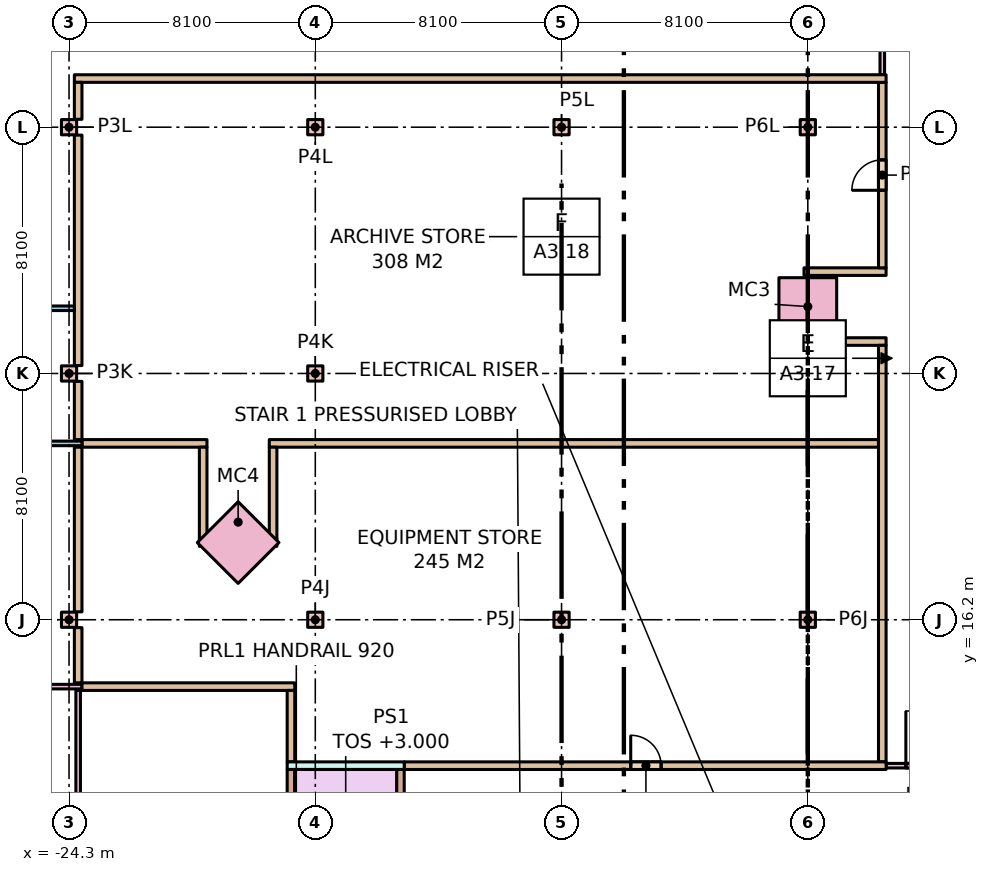
"""IFC4 building model, lengths in metres.
Left out: names, types, materials, properties, quantities, classifications, styles, units other than length and angle.
Written with IfcOpenShell. Run it as: python <this file> out.ifc"""

import sys

from ifc_helpers import new_model, si_unit, direction, frame, frame_2d, origin, origin_2d, place, context, subcontext, project, spatial, rectangle, extrude, element, fill, save


model = new_model("IFC4")
c1 = context("Model", 3, precision=1e-05, world=origin(), true_north=direction((0.0, 1.0)))
c2 = subcontext(c1, "Body", "Model", "MODEL_VIEW")
j1 = project(units=[si_unit("LENGTHUNIT", "METRE"), si_unit("PLANEANGLEUNIT", "RADIAN")], contexts=[c1])
p1 = place(None, origin())
s1 = spatial("IfcSite", under=j1, at=p1, CompositionType="ELEMENT")
p2 = place(p1, origin())
s2 = spatial("IfcBuilding", under=s1, at=p2, CompositionType="ELEMENT")
p3 = place(p2, origin())
s3 = spatial("IfcBuildingStorey", under=s2, at=p3, CompositionType="ELEMENT", Elevation=0.0)
for number, where, z_axis, x_axis in (
    (1, (-24.3, 16.2, 0.0), (0.0, 0.0, 1.0), (1.0, 0.0, 0.0)),
    (2, (-24.3, 24.3, 0.0), (0.0, 0.0, 1.0), (1.0, 0.0, 0.0)),
    (3, (-24.3, 32.4, 0.0), (0.0, 0.0, 1.0), (1.0, 0.0, 0.0)),
    (4, (-16.2, 16.2, 0.0), (0.0, 0.0, 1.0), (1.0, 0.0, 0.0)),
    (5, (-16.2, 24.3, 0.0), (0.0, 0.0, 1.0), (1.0, 0.0, 0.0)),
    (6, (-16.2, 32.4, 0.0), (0.0, 0.0, 1.0), (1.0, 0.0, 0.0)),
    (7, (-8.1, 16.2, 0.0), (0.0, 0.0, 1.0), (1.0, 0.0, 0.0)),
    (8, (-8.1, 32.4, 0.0), (0.0, 0.0, 1.0), (1.0, 0.0, 0.0)),
    (9, (0.0, 16.2, 0.0), (0.0, 0.0, 1.0), (1.0, 0.0, 0.0)),
    (10, (0.0, 32.4, 0.0), (0.0, 0.0, 1.0), (1.0, 0.0, 0.0)),
):
    element("IfcColumn", number, at=place(p3, frame(where, z_axis=z_axis, x_axis=x_axis)), inside=s3, PredefinedType="COLUMN", context=c2, shape_type="SweptSolid", body=[
        extrude(rectangle(XDim=0.5, YDim=0.5, at=origin_2d()), origin(), (0.0, 0.0, 1.0), 6.0),
    ])
for number, where, z_axis, x_axis in (
    (11, (0.0, 26.5, 0.0), (0.0, 0.0, 1.0), (-1.0, 0.0, 0.0)),
    (12, (-18.738, 18.738, 0.0), (0.0, 0.0, 1.0), (-0.707, -0.707, 0.0)),
):
    element("IfcColumn", number, at=place(p3, frame(where, z_axis=z_axis, x_axis=x_axis)), inside=s3, PredefinedType="COLUMN", context=c2, shape_type="SweptSolid", body=[
        extrude(rectangle(XDim=1.9, YDim=1.9, at=origin_2d()), origin(), (0.0, 0.0, 1.0), 6.0),
    ])
for number, where, z_axis, x_axis in (
    (13, (-20.013, 18.738, 0.0), (0.0, 0.0, 1.0), (1.0, 0.0, 0.0)),
    (14, (-17.778, 18.738, 0.0), (0.0, 0.0, 1.0), (1.0, 0.0, 0.0)),
):
    element("IfcWall", number, at=place(p3, frame(where, z_axis=z_axis, x_axis=x_axis)), inside=s3, PredefinedType="PARTITIONING", context=c2, shape_type="SweptSolid", body=[
        extrude(rectangle(XDim=0.315, YDim=0.25, at=frame_2d((0.157, 0.0))), origin(), (0.0, 0.0, 1.0), 5.68),
    ])
p4 = place(p3, frame((-23.875, 22.0, 0.0), z_axis=(0.0, 0.0, 1.0), x_axis=(1.0, 0.0, 0.0)))
e15 = element("IfcWall", 15, at=p4, inside=s3, PredefinedType="PARTITIONING", context=c2, shape_type="SweptSolid", body=[
    extrude(rectangle(XDim=4.112, YDim=0.25, at=frame_2d((2.056, 0.0))), origin(), (0.0, 0.0, 1.0), 5.68),
])
p5 = place(p3, frame((-17.713, 22.0, 0.0), z_axis=(0.0, 0.0, 1.0), x_axis=(1.0, 0.0, 0.0)))
e16 = element("IfcWall", 16, at=p5, inside=s3, PredefinedType="PARTITIONING", context=c2, shape_type="SweptSolid", body=[
    extrude(rectangle(XDim=20.038, YDim=0.25, at=frame_2d((10.019, 0.0))), origin(), (0.0, 0.0, 1.0), 5.68),
])
for number, where, z_axis, x_axis in (
    (17, (-19.888, 18.863, 0.0), (0.0, 0.0, 1.0), (0.0, 1.0, 0.0)),
    (18, (-17.588, 18.863, 0.0), (0.0, 0.0, 1.0), (0.0, 1.0, 0.0)),
):
    element("IfcWall", number, at=place(p3, frame(where, z_axis=z_axis, x_axis=x_axis)), inside=s3, PredefinedType="PARTITIONING", context=c2, shape_type="SweptSolid", body=[
        extrude(rectangle(XDim=3.012, YDim=0.25, at=frame_2d((1.506, 0.0))), origin(), (0.0, 0.0, 1.0), 5.68),
    ])
for number, where, z_axis, x_axis in (
    (19, (-0.125, 25.35, 0.0), (0.0, 0.0, 1.0), (1.0, 0.0, 0.0)),
    (20, (-0.125, 27.65, 0.0), (0.0, 0.0, 1.0), (1.0, 0.0, 0.0)),
):
    element("IfcWall", number, at=place(p3, frame(where, z_axis=z_axis, x_axis=x_axis)), inside=s3, PredefinedType="PARTITIONING", context=c2, shape_type="SweptSolid", body=[
        extrude(rectangle(XDim=2.7, YDim=0.25, at=frame_2d((1.35, 0.0))), origin(), (0.0, 0.0, 1.0), 5.68),
    ])
p6 = place(p3, frame((2.45, 27.775, 0.0), z_axis=(0.0, 0.0, 1.0), x_axis=(0.0, 1.0, 0.0)))
e21 = element("IfcWall", 21, at=p6, inside=s3, PredefinedType="PARTITIONING", context=c2, shape_type="SweptSolid", body=[
    extrude(rectangle(XDim=6.1, YDim=0.25, at=frame_2d((3.05, 0.0))), origin(), (0.0, 0.0, 1.0), 5.68),
])
p7 = place(p6, frame((2.55, 0.0, 0.0)))
e22 = element("IfcOpeningElement", 22, at=p7, cuts=e21, PredefinedType="OPENING", context=c2, shape_type="SweptSolid", body=[
    extrude(rectangle(XDim=1.0, YDim=2.1, at=frame_2d((0.5, 1.05))), frame((0.0, 0.135, 0.0), z_axis=(0.0, -1.0, 0.0), x_axis=(1.0, 0.0, 0.0)), (0.0, 0.0, 1.0), 0.27),
])
p8 = place(p3, frame((-24.0, 22.125, 0.0), z_axis=(0.0, 0.0, 1.0), x_axis=(0.0, 1.0, 0.0)))
e23 = element("IfcWall", 23, at=p8, inside=s3, PredefinedType="PARTITIONING", context=c2, shape_type="SweptSolid", body=[
    extrude(rectangle(XDim=1.915, YDim=0.25, at=frame_2d((0.958, 0.0))), origin(), (0.0, 0.0, 1.0), 5.68),
])
p9 = place(p3, frame((-24.0, 24.56, 0.0), z_axis=(0.0, 0.0, 1.0), x_axis=(0.0, 1.0, 0.0)))
e24 = element("IfcWall", 24, at=p9, inside=s3, PredefinedType="PARTITIONING", context=c2, shape_type="SweptSolid", body=[
    extrude(rectangle(XDim=7.58, YDim=0.25, at=frame_2d((3.79, 0.0))), origin(), (0.0, 0.0, 1.0), 5.68),
])
p10 = place(p3, frame((-24.125, 34.0, 0.0), z_axis=(0.0, 0.0, 1.0), x_axis=(1.0, 0.0, 0.0)))
e25 = element("IfcWall", 25, at=p10, inside=s3, PredefinedType="PARTITIONING", context=c2, shape_type="SweptSolid", body=[
    extrude(rectangle(XDim=26.7, YDim=0.25, at=frame_2d((13.35, 0.0))), origin(), (0.0, 0.0, 1.0), 5.68),
])
p11 = place(p3, frame((-24.0, 32.66, 0.0), z_axis=(0.0, 0.0, 1.0), x_axis=(0.0, 1.0, 0.0)))
e26 = element("IfcWall", 26, at=p11, inside=s3, PredefinedType="PARTITIONING", context=c2, shape_type="SweptSolid", body=[
    extrude(rectangle(XDim=1.215, YDim=0.25, at=frame_2d((0.607, 0.0))), origin(), (0.0, 0.0, 1.0), 5.68),
])
p12 = place(p3, frame((-37.5, 14.0, 0.0), z_axis=(0.0, 0.0, 1.0), x_axis=(1.0, 0.0, 0.0)))
e27 = element("IfcWall", 27, at=p12, inside=s3, PredefinedType="PARTITIONING", context=c2, shape_type="SweptSolid", body=[
    extrude(rectangle(XDim=13.625, YDim=0.15, at=frame_2d((6.812, 0.0))), origin(), (0.0, 0.0, 1.0), 5.68),
])
p13 = place(p12, frame((5.95, 0.0, 0.0)))
e28 = element("IfcOpeningElement", 28, at=p13, cuts=e27, PredefinedType="OPENING", context=c2, shape_type="SweptSolid", body=[
    extrude(rectangle(XDim=1.8, YDim=2.4, at=frame_2d((0.9, 1.2))), frame((0.0, 0.085, 0.0), z_axis=(0.0, -1.0, 0.0), x_axis=(1.0, 0.0, 0.0)), (0.0, 0.0, 1.0), 0.17),
])
p14 = place(p3, frame((-24.0, -2.375, 0.0), z_axis=(0.0, 0.0, 1.0), x_axis=(0.0, 1.0, 0.0)))
e29 = element("IfcWall", 29, at=p14, inside=s3, PredefinedType="PARTITIONING", context=c2, shape_type="SweptSolid", body=[
    extrude(rectangle(XDim=16.25, YDim=0.15, at=frame_2d((8.125, 0.0))), origin(), (0.0, 0.0, 1.0), 5.68),
])
p15 = place(p3, frame((2.45, 11.525, 0.0), z_axis=(0.0, 0.0, 1.0), x_axis=(0.0, 1.0, 0.0)))
e30 = element("IfcWall", 30, at=p15, inside=s3, PredefinedType="PARTITIONING", context=c2, shape_type="SweptSolid", body=[
    extrude(rectangle(XDim=13.7, YDim=0.25, at=frame_2d((6.85, 0.0))), origin(), (0.0, 0.0, 1.0), 5.68),
])
p16 = place(p3, frame((-24.0, 14.125, 0.0), z_axis=(0.0, 0.0, 1.0), x_axis=(0.0, 1.0, 0.0)))
e31 = element("IfcWall", 31, at=p16, inside=s3, PredefinedType="PARTITIONING", context=c2, shape_type="SweptSolid", body=[
    extrude(rectangle(XDim=1.815, YDim=0.25, at=frame_2d((0.907, 0.0))), origin(), (0.0, 0.0, 1.0), 5.68),
])
p17 = place(p3, frame((-24.0, 16.46, 0.0), z_axis=(0.0, 0.0, 1.0), x_axis=(0.0, 1.0, 0.0)))
e32 = element("IfcWall", 32, at=p17, inside=s3, PredefinedType="PARTITIONING", context=c2, shape_type="SweptSolid", body=[
    extrude(rectangle(XDim=5.415, YDim=0.25, at=frame_2d((2.708, 0.0))), origin(), (0.0, 0.0, 1.0), 5.68),
])
p18 = place(p3, frame((-17.125, 11.4, 0.0), z_axis=(0.0, 0.0, 1.0), x_axis=(1.0, 0.0, 0.0)))
e33 = element("IfcWall", 33, at=p18, inside=s3, PredefinedType="STANDARD", context=c2, shape_type="SweptSolid", body=[
    extrude(rectangle(XDim=3.85, YDim=0.25, at=frame_2d((1.925, 0.0))), origin(), (0.0, 0.0, 1.0), 5.68),
])
p19 = place(p3, frame((-13.275, 11.4, 0.0), z_axis=(0.0, 0.0, 1.0), x_axis=(1.0, 0.0, 0.0)))
e34 = element("IfcWall", 34, at=p19, inside=s3, PredefinedType="PARTITIONING", context=c2, shape_type="SweptSolid", body=[
    extrude(rectangle(XDim=15.85, YDim=0.25, at=frame_2d((7.925, 0.0))), origin(), (0.0, 0.0, 1.0), 5.68),
])
p20 = place(p19, frame((7.45, 0.0, 0.0)))
e35 = element("IfcOpeningElement", 35, at=p20, cuts=e34, PredefinedType="OPENING", context=c2, shape_type="SweptSolid", body=[
    extrude(rectangle(XDim=1.0, YDim=2.1, at=frame_2d((0.5, 1.05))), frame((0.0, 0.135, 0.0), z_axis=(0.0, -1.0, 0.0), x_axis=(1.0, 0.0, 0.0)), (0.0, 0.0, 1.0), 0.27),
])
p21 = place(p3, frame((-23.875, 14.0, 0.0), z_axis=(0.0, 0.0, 1.0), x_axis=(1.0, 0.0, 0.0)))
e36 = element("IfcWall", 36, at=p21, inside=s3, PredefinedType="PARTITIONING", context=c2, shape_type="SweptSolid", body=[
    extrude(rectangle(XDim=7.0, YDim=0.25, at=frame_2d((3.5, 0.0))), origin(), (0.0, 0.0, 1.0), 5.68),
])
p22 = place(p3, frame((-17.0, 11.525, 0.0), z_axis=(0.0, 0.0, 1.0), x_axis=(0.0, 1.0, 0.0)))
e37 = element("IfcWall", 37, at=p22, inside=s3, PredefinedType="PARTITIONING", context=c2, shape_type="SweptSolid", body=[
    extrude(rectangle(XDim=2.35, YDim=0.25, at=frame_2d((1.175, 0.0))), origin(), (0.0, 0.0, 1.0), 5.68),
])
p23 = place(p3, frame((2.575, 11.4, 0.0), z_axis=(0.0, 0.0, 1.0), x_axis=(1.0, 0.0, 0.0)))
e38 = element("IfcWall", 38, at=p23, inside=s3, PredefinedType="PARTITIONING", context=c2, shape_type="SweptSolid", body=[
    extrude(rectangle(XDim=3.2, YDim=0.15, at=frame_2d((1.6, 0.0))), origin(), (0.0, 0.0, 1.0), 5.68),
])
p24 = place(p23, frame((0.65, 0.0, 0.0)))
e39 = element("IfcOpeningElement", 39, at=p24, cuts=e38, PredefinedType="OPENING", context=c2, shape_type="SweptSolid", body=[
    extrude(rectangle(XDim=1.8, YDim=2.4, at=frame_2d((0.9, 1.2))), frame((0.0, 0.085, 0.0), z_axis=(0.0, -1.0, 0.0), x_axis=(1.0, 0.0, 0.0)), (0.0, 0.0, 1.0), 0.17),
])
p25 = place(p3, frame((2.45, 34.125, 0.0), z_axis=(0.0, 0.0, 1.0), x_axis=(0.0, 1.0, 0.0)))
e40 = element("IfcWall", 40, at=p25, inside=s3, PredefinedType="PARTITIONING", context=c2, shape_type="SweptSolid", body=[
    extrude(rectangle(XDim=9.375, YDim=0.15, at=frame_2d((4.688, 0.0))), origin(), (0.0, 0.0, 1.0), 5.68),
])
p26 = place(p25, frame((4.15, 0.0, 0.0)))
e41 = element("IfcOpeningElement", 41, at=p26, cuts=e40, PredefinedType="OPENING", context=c2, shape_type="SweptSolid", body=[
    extrude(rectangle(XDim=1.0, YDim=2.1, at=frame_2d((0.5, 1.05))), frame((0.0, 0.085, 0.0), z_axis=(0.0, -1.0, 0.0), x_axis=(1.0, 0.0, 0.0)), (0.0, 0.0, 1.0), 0.17),
])
p27 = place(p3, frame((-37.5, 22.0, 0.0), z_axis=(0.0, 0.0, 1.0), x_axis=(1.0, 0.0, 0.0)))
e42 = element("IfcWall", 42, at=p27, inside=s3, PredefinedType="PARTITIONING", context=c2, shape_type="SweptSolid", body=[
    extrude(rectangle(XDim=13.625, YDim=0.15, at=frame_2d((6.812, 0.0))), origin(), (0.0, 0.0, 1.0), 5.68),
])
p28 = place(p27, frame((6.35, 0.0, 0.0)))
e43 = element("IfcOpeningElement", 43, at=p28, cuts=e42, PredefinedType="OPENING", context=c2, shape_type="SweptSolid", body=[
    extrude(rectangle(XDim=1.0, YDim=2.1, at=frame_2d((0.5, 1.05))), frame((0.0, 0.085, 0.0), z_axis=(0.0, -1.0, 0.0), x_axis=(1.0, 0.0, 0.0)), (0.0, 0.0, 1.0), 0.17),
])
p29 = place(p3, frame((-13.4, 1.925, 0.0), z_axis=(0.0, 0.0, 1.0), x_axis=(0.0, 1.0, 0.0)))
e44 = element("IfcWall", 44, at=p29, inside=s3, PredefinedType="STANDARD", context=c2, shape_type="SweptSolid", body=[
    extrude(rectangle(XDim=9.35, YDim=0.25, at=frame_2d((4.675, 0.0))), origin(), (0.0, 0.0, 1.0), 5.68),
])
p30 = place(p29, frame((0.3, 0.0, 0.0)))
e45 = element("IfcOpeningElement", 45, at=p30, cuts=e44, PredefinedType="OPENING", context=c2, shape_type="SweptSolid", body=[
    extrude(rectangle(XDim=1.0, YDim=2.1, at=frame_2d((0.5, 1.05))), frame((0.0, 0.135, 0.0), z_axis=(0.0, -1.0, 0.0), x_axis=(1.0, 0.0, 0.0)), (0.0, 0.0, 1.0), 0.27),
])
p31 = place(p3, frame((-17.0, 1.925, 0.0), z_axis=(0.0, 0.0, 1.0), x_axis=(0.0, 1.0, 0.0)))
e46 = element("IfcWall", 46, at=p31, inside=s3, PredefinedType="STANDARD", context=c2, shape_type="SweptSolid", body=[
    extrude(rectangle(XDim=9.35, YDim=0.25, at=frame_2d((4.675, 0.0))), origin(), (0.0, 0.0, 1.0), 5.68),
])
p32 = place(p3, frame((-33.775, 26.444, 0.0), z_axis=(0.0, 0.0, 1.0), x_axis=(1.0, 0.0, 0.0)))
e47 = element("IfcWall", 47, at=p32, inside=s3, PredefinedType="PARTITIONING", context=c2, shape_type="SweptSolid", body=[
    extrude(rectangle(XDim=9.65, YDim=0.15, at=frame_2d((4.825, 0.0))), origin(), (0.0, 0.0, 1.0), 5.68),
])
p33 = place(p20, origin())
e48 = element("IfcDoor", 48, at=p33, inside=s3, OperationType="SINGLE_SWING_LEFT", PredefinedType="DOOR", context=c2, shape_type="SweptSolid", body=[
    extrude(rectangle(XDim=1.0, YDim=2.1, at=frame_2d((0.5, 1.05))), frame((0.0, 0.025, 0.0), z_axis=(0.0, -1.0, 0.0), x_axis=(1.0, 0.0, 0.0)), (0.0, 0.0, 1.0), 0.05),
])
fill(e35, e48)
p34 = place(p7, origin())
e49 = element("IfcDoor", 49, at=p34, inside=s3, OperationType="SINGLE_SWING_LEFT", PredefinedType="DOOR", context=c2, shape_type="SweptSolid", body=[
    extrude(rectangle(XDim=1.0, YDim=2.1, at=frame_2d((0.5, 1.05))), frame((0.0, 0.025, 0.0), z_axis=(0.0, -1.0, 0.0), x_axis=(1.0, 0.0, 0.0)), (0.0, 0.0, 1.0), 0.05),
])
fill(e22, e49)
p35 = place(p24, origin())
e50 = element("IfcDoor", 50, at=p35, inside=s3, OperationType="SINGLE_SWING_LEFT", PredefinedType="DOOR", context=c2, shape_type="SweptSolid", body=[
    extrude(rectangle(XDim=1.8, YDim=2.4, at=frame_2d((0.9, 1.2))), frame((0.0, 0.025, 0.0), z_axis=(0.0, -1.0, 0.0), x_axis=(1.0, 0.0, 0.0)), (0.0, 0.0, 1.0), 0.05),
])
fill(e39, e50)
save(model, sys.argv[1])
